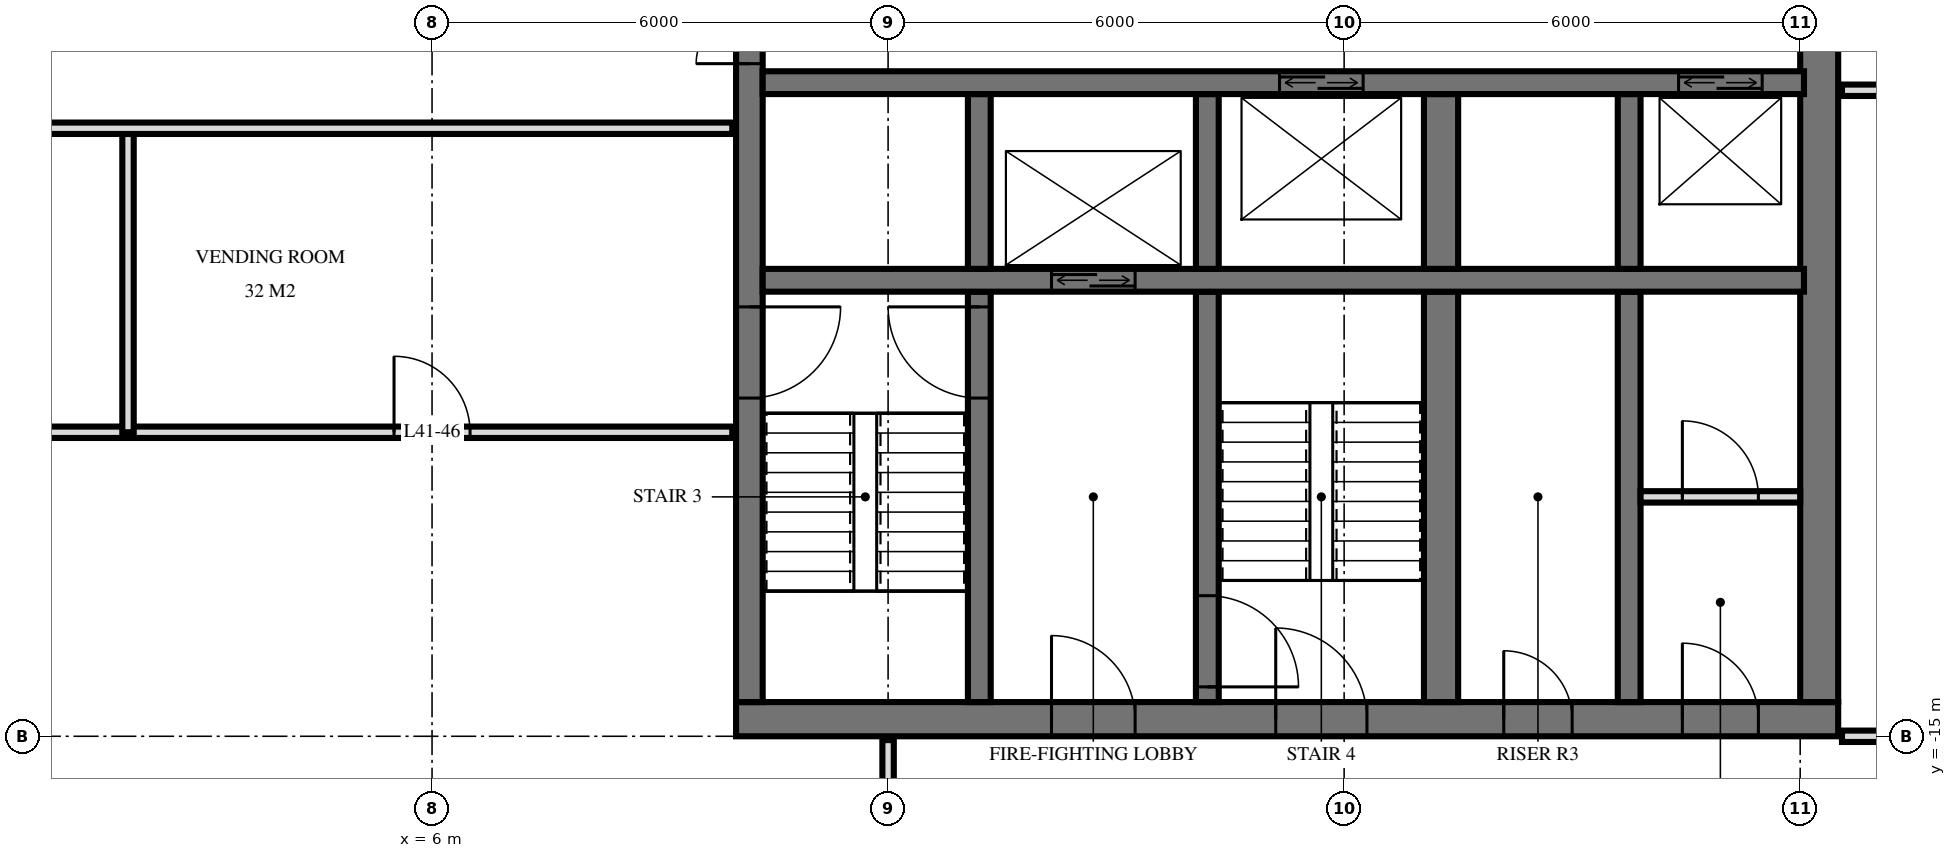
"""IFC4 building model, lengths in metres.
Left out: names, types, materials, properties, quantities, classifications, styles, units other than length and angle.
Written with IfcOpenShell. Run it as: python <this file> out.ifc"""

import sys

from ifc_helpers import new_model, si_unit, direction, frame, frame_2d, origin, place, context, subcontext, project, spatial, rectangle, extrude, element, fill, save


model = new_model("IFC4")
c1 = context("Model", 3, precision=1e-05, world=origin(), true_north=direction((0.0, 1.0)))
c2 = subcontext(c1, "Body", "Model", "MODEL_VIEW")
j1 = project(units=[si_unit("LENGTHUNIT", "METRE"), si_unit("PLANEANGLEUNIT", "RADIAN")], contexts=[c1])
p1 = place(None, origin())
s1 = spatial("IfcSite", under=j1, at=p1, CompositionType="ELEMENT")
p2 = place(p1, origin())
s2 = spatial("IfcBuilding", under=s1, at=p2, CompositionType="ELEMENT")
p3 = place(p2, frame((0.0, 0.0, 159.6)))
s3 = spatial("IfcBuildingStorey", under=s2, at=p3, CompositionType="ELEMENT", Elevation=159.6)
p4 = place(p3, frame((10.0, -14.775, 0.0), z_axis=(0.0, 0.0, 1.0), x_axis=(1.0, 0.0, 0.0)))
e1 = element("IfcWall", 1, at=p4, inside=s3, PredefinedType="SHEAR", context=c2, shape_type="SweptSolid", body=[
    extrude(rectangle(XDim=14.5, YDim=0.45, at=frame_2d((7.25, 0.0))), origin(), (0.0, 0.0, 1.0), 3.6),
])
p5 = place(p4, frame((7.1, 0.0, 0.0)))
e2 = element("IfcOpeningElement", 2, at=p5, cuts=e1, PredefinedType="OPENING", context=c2, shape_type="SweptSolid", body=[
    extrude(rectangle(XDim=1.2, YDim=2.1, at=frame_2d((0.6, 1.05))), frame((0.0, 0.235, 0.0), z_axis=(0.0, -1.0, 0.0), x_axis=(1.0, 0.0, 0.0)), (0.0, 0.0, 1.0), 0.47),
])
p6 = place(p4, frame((4.15, 0.0, 0.0)))
e3 = element("IfcOpeningElement", 3, at=p6, cuts=e1, PredefinedType="OPENING", context=c2, shape_type="SweptSolid", body=[
    extrude(rectangle(XDim=1.1, YDim=2.1, at=frame_2d((0.55, 1.05))), frame((0.0, 0.235, 0.0), z_axis=(0.0, -1.0, 0.0), x_axis=(1.0, 0.0, 0.0)), (0.0, 0.0, 1.0), 0.47),
])
p7 = place(p4, frame((10.1, 0.0, 0.0)))
e4 = element("IfcOpeningElement", 4, at=p7, cuts=e1, PredefinedType="OPENING", context=c2, shape_type="SweptSolid", body=[
    extrude(rectangle(XDim=0.9, YDim=2.1, at=frame_2d((0.45, 1.05))), frame((0.0, 0.235, 0.0), z_axis=(0.0, -1.0, 0.0), x_axis=(1.0, 0.0, 0.0)), (0.0, 0.0, 1.0), 0.47),
])
p8 = place(p4, frame((12.45, 0.0, 0.0)))
e5 = element("IfcOpeningElement", 5, at=p8, cuts=e1, PredefinedType="OPENING", context=c2, shape_type="SweptSolid", body=[
    extrude(rectangle(XDim=1.0, YDim=2.1, at=frame_2d((0.5, 1.05))), frame((0.0, 0.235, 0.0), z_axis=(0.0, -1.0, 0.0), x_axis=(1.0, 0.0, 0.0)), (0.0, 0.0, 1.0), 0.47),
])
p9 = place(p3, frame((10.175, -14.55, 0.0), z_axis=(0.0, 0.0, 1.0), x_axis=(0.0, 1.0, 0.0)))
e6 = element("IfcWall", 6, at=p9, inside=s3, PredefinedType="SHEAR", context=c2, shape_type="SweptSolid", body=[
    extrude(rectangle(XDim=14.1, YDim=0.35, at=frame_2d((7.05, 0.0))), origin(), (0.0, 0.0, 1.0), 3.6),
])
p10 = place(p9, frame((8.4, 0.0, 0.0)))
e7 = element("IfcOpeningElement", 7, at=p10, cuts=e6, PredefinedType="OPENING", context=c2, shape_type="SweptSolid", body=[
    extrude(rectangle(XDim=1.4, YDim=2.4, at=frame_2d((0.7, 1.2))), frame((0.0, 0.185, 0.0), z_axis=(0.0, -1.0, 0.0), x_axis=(1.0, 0.0, 0.0)), (0.0, 0.0, 1.0), 0.37),
])
p11 = place(p9, frame((10.0, 0.0, 0.0)))
e8 = element("IfcOpeningElement", 8, at=p11, cuts=e6, PredefinedType="OPENING", context=c2, shape_type="SweptSolid", body=[
    extrude(rectangle(XDim=1.4, YDim=2.4, at=frame_2d((0.7, 1.2))), frame((0.0, 0.185, 0.0), z_axis=(0.0, -1.0, 0.0), x_axis=(1.0, 0.0, 0.0)), (0.0, 0.0, 1.0), 0.37),
])
p12 = place(p9, frame((4.0, 0.0, 0.0)))
e9 = element("IfcOpeningElement", 9, at=p12, cuts=e6, PredefinedType="OPENING", context=c2, shape_type="SweptSolid", body=[
    extrude(rectangle(XDim=1.2, YDim=2.1, at=frame_2d((0.6, 1.05))), frame((0.0, 0.185, 0.0), z_axis=(0.0, -1.0, 0.0), x_axis=(1.0, 0.0, 0.0)), (0.0, 0.0, 1.0), 0.37),
])
p13 = place(p3, frame((24.25, -14.55, 0.0), z_axis=(0.0, 0.0, 1.0), x_axis=(0.0, 1.0, 0.0)))
e10 = element("IfcWall", 10, at=p13, inside=s3, PredefinedType="SHEAR", context=c2, shape_type="SweptSolid", body=[
    extrude(rectangle(XDim=14.1, YDim=0.5, at=frame_2d((7.05, 0.0))), origin(), (0.0, 0.0, 1.0), 3.6),
])
p14 = place(p3, frame((10.35, -6.4, 0.0), z_axis=(0.0, 0.0, 1.0), x_axis=(1.0, 0.0, 0.0)))
e11 = element("IfcWall", 11, at=p14, inside=s3, PredefinedType="SHEAR", context=c2, shape_type="SweptSolid", body=[
    extrude(rectangle(XDim=13.7, YDim=0.3, at=frame_2d((6.85, 0.0))), origin(), (0.0, 0.0, 1.0), 3.6),
])
p15 = place(p14, frame((12.05, 0.0, 0.0)))
e12 = element("IfcOpeningElement", 12, at=p15, cuts=e11, PredefinedType="OPENING", context=c2, shape_type="SweptSolid", body=[
    extrude(rectangle(XDim=1.1, YDim=2.1, at=frame_2d((0.55, 1.05))), frame((0.0, 0.16, 0.0), z_axis=(0.0, -1.0, 0.0), x_axis=(1.0, 0.0, 0.0)), (0.0, 0.0, 1.0), 0.32),
])
p16 = place(p14, frame((6.8, 0.0, 0.0)))
e13 = element("IfcOpeningElement", 13, at=p16, cuts=e11, PredefinedType="OPENING", context=c2, shape_type="SweptSolid", body=[
    extrude(rectangle(XDim=1.1, YDim=2.1, at=frame_2d((0.55, 1.05))), frame((0.0, 0.16, 0.0), z_axis=(0.0, -1.0, 0.0), x_axis=(1.0, 0.0, 0.0)), (0.0, 0.0, 1.0), 0.32),
])
p17 = place(p3, frame((10.35, -9.0, 0.0), z_axis=(0.0, 0.0, 1.0), x_axis=(1.0, 0.0, 0.0)))
e14 = element("IfcWall", 14, at=p17, inside=s3, PredefinedType="SHEAR", context=c2, shape_type="SweptSolid", body=[
    extrude(rectangle(XDim=13.7, YDim=0.3, at=frame_2d((6.85, 0.0))), origin(), (0.0, 0.0, 1.0), 3.6),
])
p18 = place(p17, frame((3.8, 0.0, 0.0)))
e15 = element("IfcOpeningElement", 15, at=p18, cuts=e14, PredefinedType="OPENING", context=c2, shape_type="SweptSolid", body=[
    extrude(rectangle(XDim=1.1, YDim=2.1, at=frame_2d((0.55, 1.05))), frame((0.0, 0.16, 0.0), z_axis=(0.0, -1.0, 0.0), x_axis=(1.0, 0.0, 0.0)), (0.0, 0.0, 1.0), 0.32),
])
p19 = place(p3, frame((13.2, -8.85, 0.0), z_axis=(0.0, 0.0, 1.0), x_axis=(0.0, 1.0, 0.0)))
e16 = element("IfcWall", 16, at=p19, inside=s3, PredefinedType="SHEAR", context=c2, shape_type="SweptSolid", body=[
    extrude(rectangle(XDim=2.3, YDim=0.3, at=frame_2d((1.15, 0.0))), origin(), (0.0, 0.0, 1.0), 3.6),
])
p20 = place(p3, frame((13.2, -14.55, 0.0), z_axis=(0.0, 0.0, 1.0), x_axis=(0.0, 1.0, 0.0)))
e17 = element("IfcWall", 17, at=p20, inside=s3, PredefinedType="SHEAR", context=c2, shape_type="SweptSolid", body=[
    extrude(rectangle(XDim=5.4, YDim=0.3, at=frame_2d((2.7, 0.0))), origin(), (0.0, 0.0, 1.0), 3.6),
])
p21 = place(p20, frame((4.0, 0.0, 0.0)))
e18 = element("IfcOpeningElement", 18, at=p21, cuts=e17, PredefinedType="OPENING", context=c2, shape_type="SweptSolid", body=[
    extrude(rectangle(XDim=1.2, YDim=2.1, at=frame_2d((0.6, 1.05))), frame((0.0, 0.16, 0.0), z_axis=(0.0, -1.0, 0.0), x_axis=(1.0, 0.0, 0.0)), (0.0, 0.0, 1.0), 0.32),
])
p22 = place(p3, frame((16.2, -8.85, 0.0), z_axis=(0.0, 0.0, 1.0), x_axis=(0.0, 1.0, 0.0)))
e19 = element("IfcWall", 19, at=p22, inside=s3, PredefinedType="SHEAR", context=c2, shape_type="SweptSolid", body=[
    extrude(rectangle(XDim=2.3, YDim=0.3, at=frame_2d((1.15, 0.0))), origin(), (0.0, 0.0, 1.0), 3.6),
])
p23 = place(p3, frame((16.2, -14.55, 0.0), z_axis=(0.0, 0.0, 1.0), x_axis=(0.0, 1.0, 0.0)))
e20 = element("IfcWall", 20, at=p23, inside=s3, PredefinedType="SHEAR", context=c2, shape_type="SweptSolid", body=[
    extrude(rectangle(XDim=5.4, YDim=0.3, at=frame_2d((2.7, 0.0))), origin(), (0.0, 0.0, 1.0), 3.6),
])
p24 = place(p23, frame((0.2, 0.0, 0.0)))
e21 = element("IfcOpeningElement", 21, at=p24, cuts=e20, PredefinedType="OPENING", context=c2, shape_type="SweptSolid", body=[
    extrude(rectangle(XDim=1.2, YDim=2.1, at=frame_2d((0.6, 1.05))), frame((0.0, 0.16, 0.0), z_axis=(0.0, -1.0, 0.0), x_axis=(1.0, 0.0, 0.0)), (0.0, 0.0, 1.0), 0.32),
])
p25 = place(p3, frame((19.275, -8.85, 0.0), z_axis=(0.0, 0.0, 1.0), x_axis=(0.0, 1.0, 0.0)))
e22 = element("IfcWall", 22, at=p25, inside=s3, PredefinedType="SHEAR", context=c2, shape_type="SweptSolid", body=[
    extrude(rectangle(XDim=2.3, YDim=0.45, at=frame_2d((1.15, 0.0))), origin(), (0.0, 0.0, 1.0), 3.6),
])
p26 = place(p3, frame((19.275, -14.55, 0.0), z_axis=(0.0, 0.0, 1.0), x_axis=(0.0, 1.0, 0.0)))
e23 = element("IfcWall", 23, at=p26, inside=s3, PredefinedType="SHEAR", context=c2, shape_type="SweptSolid", body=[
    extrude(rectangle(XDim=5.4, YDim=0.45, at=frame_2d((2.7, 0.0))), origin(), (0.0, 0.0, 1.0), 3.6),
])
p27 = place(p3, frame((21.75, -8.85, 0.0), z_axis=(0.0, 0.0, 1.0), x_axis=(0.0, 1.0, 0.0)))
e24 = element("IfcWall", 24, at=p27, inside=s3, PredefinedType="SHEAR", context=c2, shape_type="SweptSolid", body=[
    extrude(rectangle(XDim=2.3, YDim=0.3, at=frame_2d((1.15, 0.0))), origin(), (0.0, 0.0, 1.0), 3.6),
])
p28 = place(p3, frame((21.75, -14.55, 0.0), z_axis=(0.0, 0.0, 1.0), x_axis=(0.0, 1.0, 0.0)))
e25 = element("IfcWall", 25, at=p28, inside=s3, PredefinedType="SHEAR", context=c2, shape_type="SweptSolid", body=[
    extrude(rectangle(XDim=5.4, YDim=0.3, at=frame_2d((2.7, 0.0))), origin(), (0.0, 0.0, 1.0), 3.6),
])
p29 = place(p3, frame((21.9, -11.85, 0.0), z_axis=(0.0, 0.0, 1.0), x_axis=(1.0, 0.0, 0.0)))
e26 = element("IfcWall", 26, at=p29, inside=s3, PredefinedType="PARTITIONING", context=c2, shape_type="SweptSolid", body=[
    extrude(rectangle(XDim=2.1, YDim=0.15, at=frame_2d((1.05, 0.0))), origin(), (0.0, 0.0, 1.0), 3.3),
])
p30 = place(p29, frame((0.55, 0.0, 0.0)))
e27 = element("IfcOpeningElement", 27, at=p30, cuts=e26, PredefinedType="OPENING", context=c2, shape_type="SweptSolid", body=[
    extrude(rectangle(XDim=1.0, YDim=2.1, at=frame_2d((0.5, 1.05))), frame((0.0, 0.085, 0.0), z_axis=(0.0, -1.0, 0.0), x_axis=(1.0, 0.0, 0.0)), (0.0, 0.0, 1.0), 0.17),
])
p31 = place(p3, frame((12.0, -18.0, 0.0), z_axis=(0.0, 0.0, 1.0), x_axis=(0.0, 1.0, 0.0)))
e28 = element("IfcWall", 28, at=p31, inside=s3, PredefinedType="PARTITIONING", context=c2, shape_type="SweptSolid", body=[
    extrude(rectangle(XDim=2.95, YDim=0.15, at=frame_2d((1.475, 0.0))), origin(), (0.0, 0.0, 1.0), 3.32),
])
p32 = place(p31, frame((1.0, 0.0, 0.0)))
e29 = element("IfcOpeningElement", 29, at=p32, cuts=e28, PredefinedType="OPENING", context=c2, shape_type="SweptSolid", body=[
    extrude(rectangle(XDim=1.0, YDim=2.1, at=frame_2d((0.5, 1.05))), frame((0.0, 0.085, 0.0), z_axis=(0.0, -1.0, 0.0), x_axis=(1.0, 0.0, 0.0)), (0.0, 0.0, 1.0), 0.17),
])
p33 = place(p3, frame((2.0, -11.0, 0.0), z_axis=(0.0, 0.0, 1.0), x_axis=(0.0, 1.0, 0.0)))
e30 = element("IfcWall", 30, at=p33, inside=s3, PredefinedType="PARTITIONING", context=c2, shape_type="SweptSolid", body=[
    extrude(rectangle(XDim=4.0, YDim=0.15, at=frame_2d((2.0, 0.0))), origin(), (0.0, 0.0, 1.0), 3.32),
])
p34 = place(p3, frame((24.55, -15.0, 0.0), z_axis=(0.0, 0.0, 1.0), x_axis=(1.0, 0.0, 0.0)))
e31 = element("IfcWall", 31, at=p34, inside=s3, PredefinedType="PARTITIONING", context=c2, shape_type="SweptSolid", body=[
    extrude(rectangle(XDim=3.47, YDim=0.15, at=frame_2d((1.735, 0.0))), origin(), (0.0, 0.0, 1.0), 3.32),
])
p35 = place(p34, frame((0.9, 0.0, 0.0)))
e32 = element("IfcOpeningElement", 32, at=p35, cuts=e31, PredefinedType="OPENING", context=c2, shape_type="SweptSolid", body=[
    extrude(rectangle(XDim=1.0, YDim=2.1, at=frame_2d((0.5, 1.05))), frame((0.0, 0.085, 0.0), z_axis=(0.0, -1.0, 0.0), x_axis=(1.0, 0.0, 0.0)), (0.0, 0.0, 1.0), 0.17),
])
p36 = place(p3, frame((-9.95, -11.0, 0.0), z_axis=(0.0, 0.0, 1.0), x_axis=(1.0, 0.0, 0.0)))
e33 = element("IfcWall", 33, at=p36, inside=s3, PredefinedType="PARTITIONING", context=c2, shape_type="SweptSolid", body=[
    extrude(rectangle(XDim=19.9, YDim=0.15, at=frame_2d((9.95, 0.0))), origin(), (0.0, 0.0, 1.0), 3.32),
])
p37 = place(p36, frame((9.45, 0.0, 0.0)))
e34 = element("IfcOpeningElement", 34, at=p37, cuts=e33, PredefinedType="OPENING", context=c2, shape_type="SweptSolid", body=[
    extrude(rectangle(XDim=1.0, YDim=2.1, at=frame_2d((0.5, 1.05))), frame((0.0, 0.085, 0.0), z_axis=(0.0, -1.0, 0.0), x_axis=(1.0, 0.0, 0.0)), (0.0, 0.0, 1.0), 0.17),
])
p38 = place(p36, frame((15.45, 0.0, 0.0)))
e35 = element("IfcOpeningElement", 35, at=p38, cuts=e33, PredefinedType="OPENING", context=c2, shape_type="SweptSolid", body=[
    extrude(rectangle(XDim=1.0, YDim=2.1, at=frame_2d((0.5, 1.05))), frame((0.0, 0.085, 0.0), z_axis=(0.0, -1.0, 0.0), x_axis=(1.0, 0.0, 0.0)), (0.0, 0.0, 1.0), 0.17),
])
p39 = place(p3, frame((-9.95, -7.0, 0.0), z_axis=(0.0, 0.0, 1.0), x_axis=(1.0, 0.0, 0.0)))
e36 = element("IfcWall", 36, at=p39, inside=s3, PredefinedType="PARTITIONING", context=c2, shape_type="SweptSolid", body=[
    extrude(rectangle(XDim=19.9, YDim=0.15, at=frame_2d((9.95, 0.0))), origin(), (0.0, 0.0, 1.0), 3.32),
])
p40 = place(p39, frame((9.45, 0.0, 0.0)))
e37 = element("IfcOpeningElement", 37, at=p40, cuts=e36, PredefinedType="OPENING", context=c2, shape_type="SweptSolid", body=[
    extrude(rectangle(XDim=1.0, YDim=2.1, at=frame_2d((0.5, 1.05))), frame((0.0, 0.085, 0.0), z_axis=(0.0, -1.0, 0.0), x_axis=(1.0, 0.0, 0.0)), (0.0, 0.0, 1.0), 0.17),
])
p41 = place(p39, frame((3.45, 0.0, 0.0)))
e38 = element("IfcOpeningElement", 38, at=p41, cuts=e36, PredefinedType="OPENING", context=c2, shape_type="SweptSolid", body=[
    extrude(rectangle(XDim=1.0, YDim=2.1, at=frame_2d((0.5, 1.05))), frame((0.0, 0.085, 0.0), z_axis=(0.0, -1.0, 0.0), x_axis=(1.0, 0.0, 0.0)), (0.0, 0.0, 1.0), 0.17),
])
p42 = place(p3, frame((24.55, -6.5, 0.0), z_axis=(0.0, 0.0, 1.0), x_axis=(1.0, 0.0, 0.0)))
e39 = element("IfcWall", 39, at=p42, inside=s3, PredefinedType="PARTITIONING", context=c2, shape_type="SweptSolid", body=[
    extrude(rectangle(XDim=3.47, YDim=0.15, at=frame_2d((1.735, 0.0))), origin(), (0.0, 0.0, 1.0), 3.32),
])
p43 = place(p42, frame((1.35, 0.0, 0.0)))
e40 = element("IfcOpeningElement", 40, at=p43, cuts=e39, PredefinedType="OPENING", context=c2, shape_type="SweptSolid", body=[
    extrude(rectangle(XDim=0.9, YDim=2.1, at=frame_2d((0.45, 1.05))), frame((0.0, 0.085, 0.0), z_axis=(0.0, -1.0, 0.0), x_axis=(1.0, 0.0, 0.0)), (0.0, 0.0, 1.0), 0.17),
])
p44 = place(p15, origin())
e41 = element("IfcDoor", 41, at=p44, inside=s3, OperationType="DOUBLE_DOOR_SLIDING", PredefinedType="USERDEFINED", context=c2, shape_type="SweptSolid", body=[
    extrude(rectangle(XDim=1.1, YDim=2.1, at=frame_2d((0.55, 1.05))), frame((0.0, 0.025, 0.0), z_axis=(0.0, -1.0, 0.0), x_axis=(1.0, 0.0, 0.0)), (0.0, 0.0, 1.0), 0.05),
])
fill(e12, e41)
p45 = place(p18, origin())
e42 = element("IfcDoor", 42, at=p45, inside=s3, OperationType="DOUBLE_DOOR_SLIDING", PredefinedType="USERDEFINED", context=c2, shape_type="SweptSolid", body=[
    extrude(rectangle(XDim=1.1, YDim=2.1, at=frame_2d((0.55, 1.05))), frame((0.0, 0.025, 0.0), z_axis=(0.0, -1.0, 0.0), x_axis=(1.0, 0.0, 0.0)), (0.0, 0.0, 1.0), 0.05),
])
fill(e15, e42)
p46 = place(p16, origin())
e43 = element("IfcDoor", 43, at=p46, inside=s3, OperationType="DOUBLE_DOOR_SLIDING", PredefinedType="USERDEFINED", context=c2, shape_type="SweptSolid", body=[
    extrude(rectangle(XDim=1.1, YDim=2.1, at=frame_2d((0.55, 1.05))), frame((0.0, 0.025, 0.0), z_axis=(0.0, -1.0, 0.0), x_axis=(1.0, 0.0, 0.0)), (0.0, 0.0, 1.0), 0.05),
])
fill(e13, e43)
p47 = place(p10, origin())
e44 = element("IfcDoor", 44, at=p47, inside=s3, OperationType="DOUBLE_DOOR_SINGLE_SWING", PredefinedType="DOOR", context=c2, shape_type="SweptSolid", body=[
    extrude(rectangle(XDim=1.4, YDim=2.4, at=frame_2d((0.7, 1.2))), frame((0.0, 0.025, 0.0), z_axis=(0.0, -1.0, 0.0), x_axis=(1.0, 0.0, 0.0)), (0.0, 0.0, 1.0), 0.05),
])
fill(e7, e44)
p48 = place(p12, frame((0.6, 0.0, 0.0), z_axis=(0.0, 0.0, 1.0), x_axis=(-1.0, 0.0, 0.0)))
e45 = element("IfcDoor", 45, at=p48, inside=s3, OperationType="SINGLE_SWING_RIGHT", PredefinedType="DOOR", context=c2, shape_type="SweptSolid", body=[
    extrude(rectangle(XDim=1.2, YDim=2.1, at=frame_2d((0.0, 1.05))), frame((0.0, -0.025, 0.0), z_axis=(0.0, 1.0, 0.0), x_axis=(-1.0, 0.0, 0.0)), (0.0, 0.0, 1.0), 0.05),
])
fill(e9, e45)
p49 = place(p5, origin())
e46 = element("IfcDoor", 46, at=p49, inside=s3, OperationType="SINGLE_SWING_RIGHT", PredefinedType="DOOR", context=c2, shape_type="SweptSolid", body=[
    extrude(rectangle(XDim=1.2, YDim=2.1, at=frame_2d((0.6, 1.05))), frame((0.0, 0.025, 0.0), z_axis=(0.0, -1.0, 0.0), x_axis=(1.0, 0.0, 0.0)), (0.0, 0.0, 1.0), 0.05),
])
fill(e2, e46)
p50 = place(p6, origin())
e47 = element("IfcDoor", 47, at=p50, inside=s3, OperationType="SINGLE_SWING_RIGHT", PredefinedType="DOOR", context=c2, shape_type="SweptSolid", body=[
    extrude(rectangle(XDim=1.1, YDim=2.1, at=frame_2d((0.55, 1.05))), frame((0.0, 0.025, 0.0), z_axis=(0.0, -1.0, 0.0), x_axis=(1.0, 0.0, 0.0)), (0.0, 0.0, 1.0), 0.05),
])
fill(e3, e47)
p51 = place(p7, origin())
e48 = element("IfcDoor", 48, at=p51, inside=s3, OperationType="SINGLE_SWING_RIGHT", PredefinedType="DOOR", context=c2, shape_type="SweptSolid", body=[
    extrude(rectangle(XDim=0.9, YDim=2.1, at=frame_2d((0.45, 1.05))), frame((0.0, 0.025, 0.0), z_axis=(0.0, -1.0, 0.0), x_axis=(1.0, 0.0, 0.0)), (0.0, 0.0, 1.0), 0.05),
])
fill(e4, e48)
p52 = place(p8, origin())
e49 = element("IfcDoor", 49, at=p52, inside=s3, OperationType="SINGLE_SWING_RIGHT", PredefinedType="DOOR", context=c2, shape_type="SweptSolid", body=[
    extrude(rectangle(XDim=1.0, YDim=2.1, at=frame_2d((0.5, 1.05))), frame((0.0, 0.025, 0.0), z_axis=(0.0, -1.0, 0.0), x_axis=(1.0, 0.0, 0.0)), (0.0, 0.0, 1.0), 0.05),
])
fill(e5, e49)
p53 = place(p21, origin())
e50 = element("IfcDoor", 50, at=p53, inside=s3, OperationType="SINGLE_SWING_LEFT", PredefinedType="DOOR", context=c2, shape_type="SweptSolid", body=[
    extrude(rectangle(XDim=1.2, YDim=2.1, at=frame_2d((0.6, 1.05))), frame((0.0, 0.025, 0.0), z_axis=(0.0, -1.0, 0.0), x_axis=(1.0, 0.0, 0.0)), (0.0, 0.0, 1.0), 0.05),
])
fill(e18, e50)
p54 = place(p24, frame((0.6, 0.0, 0.0), z_axis=(0.0, 0.0, 1.0), x_axis=(-1.0, 0.0, 0.0)))
e51 = element("IfcDoor", 51, at=p54, inside=s3, OperationType="SINGLE_SWING_LEFT", PredefinedType="DOOR", context=c2, shape_type="SweptSolid", body=[
    extrude(rectangle(XDim=1.2, YDim=2.1, at=frame_2d((0.0, 1.05))), frame((0.0, -0.025, 0.0), z_axis=(0.0, 1.0, 0.0), x_axis=(-1.0, 0.0, 0.0)), (0.0, 0.0, 1.0), 0.05),
])
fill(e21, e51)
p55 = place(p30, origin())
e52 = element("IfcDoor", 52, at=p55, inside=s3, OperationType="SINGLE_SWING_RIGHT", PredefinedType="DOOR", context=c2, shape_type="SweptSolid", body=[
    extrude(rectangle(XDim=1.0, YDim=2.1, at=frame_2d((0.5, 1.05))), frame((0.0, 0.025, 0.0), z_axis=(0.0, -1.0, 0.0), x_axis=(1.0, 0.0, 0.0)), (0.0, 0.0, 1.0), 0.05),
])
fill(e27, e52)
p56 = place(p38, origin())
e53 = element("IfcDoor", 53, at=p56, inside=s3, OperationType="SINGLE_SWING_RIGHT", PredefinedType="DOOR", context=c2, shape_type="SweptSolid", body=[
    extrude(rectangle(XDim=1.0, YDim=2.1, at=frame_2d((0.5, 1.05))), frame((0.0, 0.025, 0.0), z_axis=(0.0, -1.0, 0.0), x_axis=(1.0, 0.0, 0.0)), (0.0, 0.0, 1.0), 0.05),
])
fill(e35, e53)
save(model, sys.argv[1])
